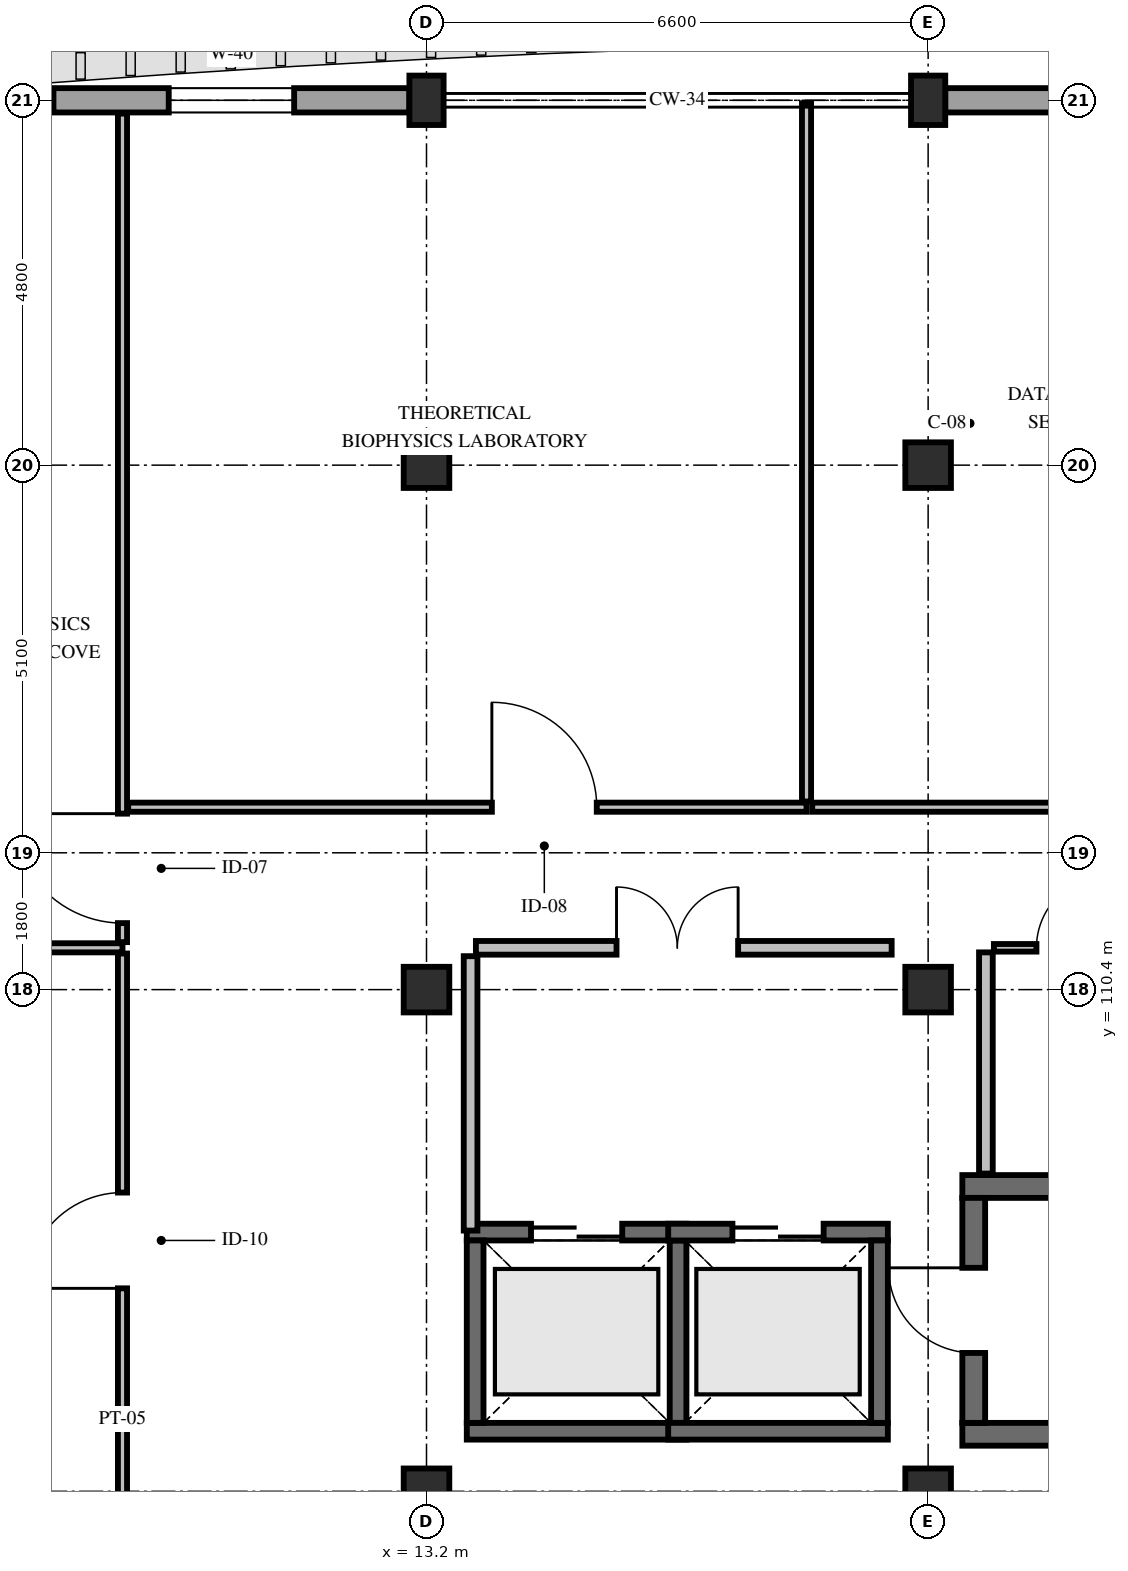
"""IFC4 building model, lengths in metres.
Left out: names, types, materials, properties, quantities, classifications, styles, units other than length and angle.
Written with IfcOpenShell. Run it as: python <this file> out.ifc"""

import sys

from ifc_helpers import new_model, si_unit, direction, frame, frame_2d, origin, origin_2d, place, context, subcontext, project, spatial, rectangle, extrude, element, fill, save


model = new_model("IFC4")
c1 = context("Model", 3, precision=1e-05, world=origin(), true_north=direction((0.0, 1.0)))
c2 = subcontext(c1, "Body", "Model", "MODEL_VIEW")
j1 = project(units=[si_unit("LENGTHUNIT", "METRE"), si_unit("PLANEANGLEUNIT", "RADIAN")], contexts=[c1])
p1 = place(None, origin())
s1 = spatial("IfcSite", under=j1, at=p1, CompositionType="ELEMENT")
p2 = place(p1, origin())
s2 = spatial("IfcBuilding", under=s1, at=p2, CompositionType="ELEMENT")
p3 = place(p2, frame((0.0, 0.0, 38.4)))
s3 = spatial("IfcBuildingStorey", under=s2, at=p3, CompositionType="ELEMENT", Elevation=38.4)
for number, where, z_axis, x_axis in (
    (1, (13.2, 103.8, 0.0), (0.0, 0.0, 1.0), (1.0, 0.0, 0.0)),
    (2, (13.2, 110.4, 0.0), (0.0, 0.0, 1.0), (1.0, 0.0, 0.0)),
    (3, (13.2, 117.3, 0.0), (0.0, 0.0, 1.0), (1.0, 0.0, 0.0)),
):
    element("IfcColumn", number, at=place(p3, frame(where, z_axis=z_axis, x_axis=x_axis)), inside=s3, PredefinedType="COLUMN", context=c2, shape_type="SweptSolid", body=[
        extrude(rectangle(XDim=0.6, YDim=0.6, at=origin_2d()), origin(), (0.0, 0.0, 1.0), 4.2),
    ])
p4 = place(p3, frame((13.2, 122.1, 0.0), z_axis=(0.0, 0.0, 1.0), x_axis=(1.0, 0.0, 0.0)))
e4 = element("IfcColumn", 4, at=p4, inside=s3, PredefinedType="PILASTER", context=c2, shape_type="SweptSolid", body=[
    extrude(rectangle(XDim=0.45, YDim=0.65, at=origin_2d()), origin(), (0.0, 0.0, 1.0), 4.2),
])
for number, where, z_axis, x_axis in (
    (5, (19.8, 103.8, 0.0), (0.0, 0.0, 1.0), (1.0, 0.0, 0.0)),
    (6, (19.8, 110.4, 0.0), (0.0, 0.0, 1.0), (1.0, 0.0, 0.0)),
    (7, (19.8, 117.3, 0.0), (0.0, 0.0, 1.0), (1.0, 0.0, 0.0)),
):
    element("IfcColumn", number, at=place(p3, frame(where, z_axis=z_axis, x_axis=x_axis)), inside=s3, PredefinedType="COLUMN", context=c2, shape_type="SweptSolid", body=[
        extrude(rectangle(XDim=0.6, YDim=0.6, at=origin_2d()), origin(), (0.0, 0.0, 1.0), 4.2),
    ])
p5 = place(p3, frame((19.8, 122.1, 0.0), z_axis=(0.0, 0.0, 1.0), x_axis=(1.0, 0.0, 0.0)))
e8 = element("IfcColumn", 8, at=p5, inside=s3, PredefinedType="PILASTER", context=c2, shape_type="SweptSolid", body=[
    extrude(rectangle(XDim=0.45, YDim=0.65, at=origin_2d()), origin(), (0.0, 0.0, 1.0), 4.2),
])
p6 = place(p3, frame((5.125, 122.1, 0.0), z_axis=(0.0, 0.0, 1.0), x_axis=(1.0, 0.0, 0.0)))
e9 = element("IfcWall", 9, at=p6, inside=s3, PredefinedType="STANDARD", context=c2, shape_type="SweptSolid", body=[
    extrude(rectangle(XDim=7.85, YDim=0.32, at=frame_2d((3.925, 0.0))), origin(), (0.0, 0.0, 1.0), 3.33),
])
p7 = place(p6, frame((1.517, 0.0, 0.85)))
e10 = element("IfcOpeningElement", 10, at=p7, cuts=e9, PredefinedType="OPENING", context=c2, shape_type="SweptSolid", body=[
    extrude(rectangle(XDim=1.65, YDim=2.08, at=frame_2d((0.825, 1.04))), frame((0.0, 0.175, 0.0), z_axis=(0.0, -1.0, 0.0), x_axis=(1.0, 0.0, 0.0)), (0.0, 0.0, 1.0), 0.35),
])
p8 = place(p6, frame((4.683, 0.0, 0.85)))
e11 = element("IfcOpeningElement", 11, at=p8, cuts=e9, PredefinedType="OPENING", context=c2, shape_type="SweptSolid", body=[
    extrude(rectangle(XDim=1.65, YDim=2.08, at=frame_2d((0.825, 1.04))), frame((0.0, 0.175, 0.0), z_axis=(0.0, -1.0, 0.0), x_axis=(1.0, 0.0, 0.0)), (0.0, 0.0, 1.0), 0.35),
])
p9 = place(p3, frame((20.025, 122.1, 0.0), z_axis=(0.0, 0.0, 1.0), x_axis=(1.0, 0.0, 0.0)))
e12 = element("IfcWall", 12, at=p9, inside=s3, PredefinedType="STANDARD", context=c2, shape_type="SweptSolid", body=[
    extrude(rectangle(XDim=7.95, YDim=0.32, at=frame_2d((3.975, 0.0))), origin(), (0.0, 0.0, 1.0), 3.33),
])
p10 = place(p9, frame((1.55, 0.0, 0.85)))
e13 = element("IfcOpeningElement", 13, at=p10, cuts=e12, PredefinedType="OPENING", context=c2, shape_type="SweptSolid", body=[
    extrude(rectangle(XDim=1.65, YDim=2.08, at=frame_2d((0.825, 1.04))), frame((0.0, 0.175, 0.0), z_axis=(0.0, -1.0, 0.0), x_axis=(1.0, 0.0, 0.0)), (0.0, 0.0, 1.0), 0.35),
])
p11 = place(p9, frame((4.75, 0.0, 0.85)))
e14 = element("IfcOpeningElement", 14, at=p11, cuts=e12, PredefinedType="OPENING", context=c2, shape_type="SweptSolid", body=[
    extrude(rectangle(XDim=1.65, YDim=2.08, at=frame_2d((0.825, 1.04))), frame((0.0, 0.175, 0.0), z_axis=(0.0, -1.0, 0.0), x_axis=(1.0, 0.0, 0.0)), (0.0, 0.0, 1.0), 0.35),
])
for number, where, z_axis, x_axis in (
    (15, (20.25, 104.55, 0.0), (0.0, 0.0, 1.0), (1.0, 0.0, 0.0)),
    (16, (20.25, 107.81, 0.0), (0.0, 0.0, 1.0), (1.0, 0.0, 0.0)),
):
    element("IfcWall", number, at=place(p3, frame(where, z_axis=z_axis, x_axis=x_axis)), inside=s3, PredefinedType="SHEAR", context=c2, shape_type="SweptSolid", body=[
        extrude(rectangle(XDim=7.6, YDim=0.3, at=frame_2d((3.8, 0.0))), origin(), (0.0, 0.0, 1.0), 3.9),
    ])
p12 = place(p3, frame((20.4, 104.7, 0.0), z_axis=(0.0, 0.0, 1.0), x_axis=(0.0, 1.0, 0.0)))
e17 = element("IfcWall", 17, at=p12, inside=s3, PredefinedType="SHEAR", context=c2, shape_type="SweptSolid", body=[
    extrude(rectangle(XDim=2.96, YDim=0.3, at=frame_2d((1.48, 0.0))), origin(), (0.0, 0.0, 1.0), 3.9),
])
p13 = place(p12, frame((0.92, 0.0, 0.0)))
e18 = element("IfcOpeningElement", 18, at=p13, cuts=e17, PredefinedType="OPENING", context=c2, shape_type="SweptSolid", body=[
    extrude(rectangle(XDim=1.12, YDim=2.2, at=frame_2d((0.56, 1.1))), frame((0.0, 0.165, 0.0), z_axis=(0.0, -1.0, 0.0), x_axis=(1.0, 0.0, 0.0)), (0.0, 0.0, 1.0), 0.33),
])
p14 = place(p3, frame((13.73, 104.59, 0.0), z_axis=(0.0, 0.0, 1.0), x_axis=(1.0, 0.0, 0.0)))
e19 = element("IfcWall", 19, at=p14, inside=s3, PredefinedType="SHEAR", context=c2, shape_type="SweptSolid", body=[
    extrude(rectangle(XDim=2.89, YDim=0.22, at=frame_2d((1.445, 0.0))), origin(), (0.0, 0.0, 1.0), 3.9),
])
p15 = place(p3, frame((13.73, 107.21, 0.0), z_axis=(0.0, 0.0, 1.0), x_axis=(1.0, 0.0, 0.0)))
e20 = element("IfcWall", 20, at=p15, inside=s3, PredefinedType="SHEAR", context=c2, shape_type="SweptSolid", body=[
    extrude(rectangle(XDim=2.89, YDim=0.22, at=frame_2d((1.445, 0.0))), origin(), (0.0, 0.0, 1.0), 3.9),
])
p16 = place(p15, frame((0.845, 0.0, 0.0)))
e21 = element("IfcOpeningElement", 21, at=p16, cuts=e20, PredefinedType="OPENING", context=c2, shape_type="SweptSolid", body=[
    extrude(rectangle(XDim=1.2, YDim=2.2, at=frame_2d((0.6, 1.1))), frame((0.0, 0.125, 0.0), z_axis=(0.0, -1.0, 0.0), x_axis=(1.0, 0.0, 0.0)), (0.0, 0.0, 1.0), 0.25),
])
for number, where, z_axis, x_axis in (
    (22, (13.84, 104.7, 0.0), (0.0, 0.0, 1.0), (0.0, 1.0, 0.0)),
    (23, (16.51, 104.7, 0.0), (0.0, 0.0, 1.0), (0.0, 1.0, 0.0)),
):
    element("IfcWall", number, at=place(p3, frame(where, z_axis=z_axis, x_axis=x_axis)), inside=s3, PredefinedType="SHEAR", context=c2, shape_type="SweptSolid", body=[
        extrude(rectangle(XDim=2.4, YDim=0.22, at=frame_2d((1.2, 0.0))), origin(), (0.0, 0.0, 1.0), 3.9),
    ])
p17 = place(p3, frame((16.38, 104.59, 0.0), z_axis=(0.0, 0.0, 1.0), x_axis=(1.0, 0.0, 0.0)))
e24 = element("IfcWall", 24, at=p17, inside=s3, PredefinedType="SHEAR", context=c2, shape_type="SweptSolid", body=[
    extrude(rectangle(XDim=2.89, YDim=0.22, at=frame_2d((1.445, 0.0))), origin(), (0.0, 0.0, 1.0), 3.9),
])
p18 = place(p3, frame((16.38, 107.21, 0.0), z_axis=(0.0, 0.0, 1.0), x_axis=(1.0, 0.0, 0.0)))
e25 = element("IfcWall", 25, at=p18, inside=s3, PredefinedType="SHEAR", context=c2, shape_type="SweptSolid", body=[
    extrude(rectangle(XDim=2.89, YDim=0.22, at=frame_2d((1.445, 0.0))), origin(), (0.0, 0.0, 1.0), 3.9),
])
p19 = place(p18, frame((0.845, 0.0, 0.0)))
e26 = element("IfcOpeningElement", 26, at=p19, cuts=e25, PredefinedType="OPENING", context=c2, shape_type="SweptSolid", body=[
    extrude(rectangle(XDim=1.2, YDim=2.2, at=frame_2d((0.6, 1.1))), frame((0.0, 0.125, 0.0), z_axis=(0.0, -1.0, 0.0), x_axis=(1.0, 0.0, 0.0)), (0.0, 0.0, 1.0), 0.25),
])
p20 = place(p3, frame((19.16, 104.7, 0.0), z_axis=(0.0, 0.0, 1.0), x_axis=(0.0, 1.0, 0.0)))
e27 = element("IfcWall", 27, at=p20, inside=s3, PredefinedType="SHEAR", context=c2, shape_type="SweptSolid", body=[
    extrude(rectangle(XDim=2.4, YDim=0.22, at=frame_2d((1.2, 0.0))), origin(), (0.0, 0.0, 1.0), 3.9),
])
p21 = place(p3, frame((13.85, 110.95, 0.0), z_axis=(0.0, 0.0, 1.0), x_axis=(1.0, 0.0, 0.0)))
e28 = element("IfcWall", 28, at=p21, inside=s3, PredefinedType="PARTITIONING", context=c2, shape_type="SweptSolid", body=[
    extrude(rectangle(XDim=5.47, YDim=0.18, at=frame_2d((2.735, 0.0))), origin(), (0.0, 0.0, 1.0), 3.745),
])
p22 = place(p21, frame((1.85, 0.0, 0.0)))
e29 = element("IfcOpeningElement", 29, at=p22, cuts=e28, PredefinedType="OPENING", context=c2, shape_type="SweptSolid", body=[
    extrude(rectangle(XDim=1.6, YDim=2.25, at=frame_2d((0.8, 1.125))), frame((0.0, 0.105, 0.0), z_axis=(0.0, -1.0, 0.0), x_axis=(1.0, 0.0, 0.0)), (0.0, 0.0, 1.0), 0.21),
])
p23 = place(p3, frame((13.78, 107.23, 0.0), z_axis=(0.0, 0.0, 1.0), x_axis=(0.0, 1.0, 0.0)))
e30 = element("IfcWall", 30, at=p23, inside=s3, PredefinedType="PARTITIONING", context=c2, shape_type="SweptSolid", body=[
    extrude(rectangle(XDim=3.61, YDim=0.18, at=frame_2d((1.805, 0.0))), origin(), (0.0, 0.0, 1.0), 3.58),
])
p24 = place(p3, frame((20.56, 107.98, 0.0), z_axis=(0.0, 0.0, 1.0), x_axis=(0.0, 1.0, 0.0)))
e31 = element("IfcWall", 31, at=p24, inside=s3, PredefinedType="PARTITIONING", context=c2, shape_type="SweptSolid", body=[
    extrude(rectangle(XDim=2.91, YDim=0.18, at=frame_2d((1.455, 0.0))), origin(), (0.0, 0.0, 1.0), 3.23),
])
p25 = place(p3, frame((20.665, 110.95, 0.0), z_axis=(0.0, 0.0, 1.0), x_axis=(1.0, 0.0, 0.0)))
e32 = element("IfcWall", 32, at=p25, inside=s3, PredefinedType="PARTITIONING", context=c2, shape_type="SweptSolid", body=[
    extrude(rectangle(XDim=2.085, YDim=0.1, at=frame_2d((1.042, 0.0))), origin(), (0.0, 0.0, 1.0), 3.745),
])
p26 = place(p25, frame((0.56, 0.0, 0.0)))
e33 = element("IfcOpeningElement", 33, at=p26, cuts=e32, PredefinedType="OPENING", context=c2, shape_type="SweptSolid", body=[
    extrude(rectangle(XDim=0.95, YDim=2.15, at=frame_2d((0.475, 1.075))), frame((0.0, 0.065, 0.0), z_axis=(0.0, -1.0, 0.0), x_axis=(1.0, 0.0, 0.0)), (0.0, 0.0, 1.0), 0.13),
])
p27 = place(p3, frame((4.975, 110.95, 0.0), z_axis=(0.0, 0.0, 1.0), x_axis=(1.0, 0.0, 0.0)))
e34 = element("IfcWall", 34, at=p27, inside=s3, PredefinedType="PARTITIONING", context=c2, shape_type="SweptSolid", body=[
    extrude(rectangle(XDim=4.225, YDim=0.12, at=frame_2d((2.112, 0.0))), origin(), (0.0, 0.0, 1.0), 3.48),
])
p28 = place(p3, frame((9.2, 103.275, 0.0), z_axis=(0.0, 0.0, 1.0), x_axis=(0.0, 1.0, 0.0)))
e35 = element("IfcWall", 35, at=p28, inside=s3, PredefinedType="PARTITIONING", context=c2, shape_type="SweptSolid", body=[
    extrude(rectangle(XDim=7.6, YDim=0.12, at=frame_2d((3.8, 0.0))), origin(), (0.0, 0.0, 1.0), 3.23),
])
p29 = place(p28, frame((3.195, 0.0, 0.0)))
e36 = element("IfcOpeningElement", 36, at=p29, cuts=e35, PredefinedType="OPENING", context=c2, shape_type="SweptSolid", body=[
    extrude(rectangle(XDim=1.26, YDim=2.2, at=frame_2d((0.63, 1.1))), frame((0.0, 0.075, 0.0), z_axis=(0.0, -1.0, 0.0), x_axis=(1.0, 0.0, 0.0)), (0.0, 0.0, 1.0), 0.15),
])
p30 = place(p3, frame((9.2, 111.025, 0.0), z_axis=(0.0, 0.0, 1.0), x_axis=(0.0, 1.0, 0.0)))
e37 = element("IfcWall", 37, at=p30, inside=s3, PredefinedType="PARTITIONING", context=c2, shape_type="SweptSolid", body=[
    extrude(rectangle(XDim=10.9, YDim=0.12, at=frame_2d((5.45, 0.0))), origin(), (0.0, 0.0, 1.0), 3.23),
])
p31 = place(p30, frame((0.25, 0.0, 0.0)))
e38 = element("IfcOpeningElement", 38, at=p31, cuts=e37, PredefinedType="OPENING", context=c2, shape_type="SweptSolid", body=[
    extrude(rectangle(XDim=1.44, YDim=2.25, at=frame_2d((0.72, 1.125))), frame((0.0, 0.075, 0.0), z_axis=(0.0, -1.0, 0.0), x_axis=(1.0, 0.0, 0.0)), (0.0, 0.0, 1.0), 0.15),
])
p32 = place(p3, frame((9.275, 112.8, 0.0), z_axis=(0.0, 0.0, 1.0), x_axis=(1.0, 0.0, 0.0)))
e39 = element("IfcWall", 39, at=p32, inside=s3, PredefinedType="PARTITIONING", context=c2, shape_type="SweptSolid", body=[
    extrude(rectangle(XDim=8.925, YDim=0.12, at=frame_2d((4.462, 0.0))), origin(), (0.0, 0.0, 1.0), 3.53),
])
p33 = place(p32, frame((4.785, 0.0, 0.0)))
e40 = element("IfcOpeningElement", 40, at=p33, cuts=e39, PredefinedType="OPENING", context=c2, shape_type="SweptSolid", body=[
    extrude(rectangle(XDim=1.38, YDim=2.25, at=frame_2d((0.69, 1.125))), frame((0.0, 0.075, 0.0), z_axis=(0.0, -1.0, 0.0), x_axis=(1.0, 0.0, 0.0)), (0.0, 0.0, 1.0), 0.15),
])
p34 = place(p3, frame((18.2, 112.875, 0.0), z_axis=(0.0, 0.0, 1.0), x_axis=(0.0, 1.0, 0.0)))
e41 = element("IfcWall", 41, at=p34, inside=s3, PredefinedType="PARTITIONING", context=c2, shape_type="SweptSolid", body=[
    extrude(rectangle(XDim=9.185, YDim=0.12, at=frame_2d((4.593, 0.0))), origin(), (0.0, 0.0, 1.0), 3.33),
])
p35 = place(p3, frame((18.275, 112.8, 0.0), z_axis=(0.0, 0.0, 1.0), x_axis=(1.0, 0.0, 0.0)))
e42 = element("IfcWall", 42, at=p35, inside=s3, PredefinedType="PARTITIONING", context=c2, shape_type="SweptSolid", body=[
    extrude(rectangle(XDim=9.325, YDim=0.12, at=frame_2d((4.663, 0.0))), origin(), (0.0, 0.0, 1.0), 3.53),
])
p36 = place(p35, frame((3.785, 0.0, 0.0)))
e43 = element("IfcOpeningElement", 43, at=p36, cuts=e42, PredefinedType="OPENING", context=c2, shape_type="SweptSolid", body=[
    extrude(rectangle(XDim=1.68, YDim=2.3, at=frame_2d((0.84, 1.15))), frame((0.0, 0.075, 0.0), z_axis=(0.0, -1.0, 0.0), x_axis=(1.0, 0.0, 0.0)), (0.0, 0.0, 1.0), 0.15),
])
p37 = place(p7, origin())
e44 = element("IfcWindow", 44, at=p37, inside=s3, PartitioningType="SINGLE_PANEL", PredefinedType="WINDOW", context=c2, shape_type="SweptSolid", body=[
    extrude(rectangle(XDim=1.65, YDim=2.08, at=frame_2d((0.825, 1.04))), frame((0.0, 0.03, 0.0), z_axis=(0.0, -1.0, 0.0), x_axis=(1.0, 0.0, 0.0)), (0.0, 0.0, 1.0), 0.06),
])
fill(e10, e44)
p38 = place(p8, origin())
e45 = element("IfcWindow", 45, at=p38, inside=s3, PartitioningType="SINGLE_PANEL", PredefinedType="WINDOW", context=c2, shape_type="SweptSolid", body=[
    extrude(rectangle(XDim=1.65, YDim=2.08, at=frame_2d((0.825, 1.04))), frame((0.0, 0.03, 0.0), z_axis=(0.0, -1.0, 0.0), x_axis=(1.0, 0.0, 0.0)), (0.0, 0.0, 1.0), 0.06),
])
fill(e11, e45)
p39 = place(p13, origin())
e46 = element("IfcDoor", 46, at=p39, inside=s3, OperationType="SINGLE_SWING_RIGHT", PredefinedType="DOOR", context=c2, shape_type="SweptSolid", body=[
    extrude(rectangle(XDim=1.12, YDim=2.2, at=frame_2d((0.56, 1.1))), frame((0.0, 0.025, 0.0), z_axis=(0.0, -1.0, 0.0), x_axis=(1.0, 0.0, 0.0)), (0.0, 0.0, 1.0), 0.05),
])
fill(e18, e46)
p40 = place(p16, origin())
e47 = element("IfcDoor", 47, at=p40, inside=s3, OperationType="DOUBLE_DOOR_SLIDING", PredefinedType="DOOR", context=c2, shape_type="SweptSolid", body=[
    extrude(rectangle(XDim=1.2, YDim=2.2, at=frame_2d((0.6, 1.1))), frame((0.0, 0.025, 0.0), z_axis=(0.0, -1.0, 0.0), x_axis=(1.0, 0.0, 0.0)), (0.0, 0.0, 1.0), 0.05),
])
fill(e21, e47)
p41 = place(p19, origin())
e48 = element("IfcDoor", 48, at=p41, inside=s3, OperationType="DOUBLE_DOOR_SLIDING", PredefinedType="DOOR", context=c2, shape_type="SweptSolid", body=[
    extrude(rectangle(XDim=1.2, YDim=2.2, at=frame_2d((0.6, 1.1))), frame((0.0, 0.025, 0.0), z_axis=(0.0, -1.0, 0.0), x_axis=(1.0, 0.0, 0.0)), (0.0, 0.0, 1.0), 0.05),
])
fill(e26, e48)
p42 = place(p22, origin())
e49 = element("IfcDoor", 49, at=p42, inside=s3, OperationType="DOUBLE_DOOR_SINGLE_SWING", PredefinedType="DOOR", context=c2, shape_type="SweptSolid", body=[
    extrude(rectangle(XDim=1.6, YDim=2.25, at=frame_2d((0.8, 1.125))), frame((0.0, 0.025, 0.0), z_axis=(0.0, -1.0, 0.0), x_axis=(1.0, 0.0, 0.0)), (0.0, 0.0, 1.0), 0.05),
])
fill(e29, e49)
p43 = place(p26, origin())
e50 = element("IfcDoor", 50, at=p43, inside=s3, OperationType="SINGLE_SWING_RIGHT", PredefinedType="DOOR", context=c2, shape_type="SweptSolid", body=[
    extrude(rectangle(XDim=0.95, YDim=2.15, at=frame_2d((0.475, 1.075))), frame((0.0, 0.025, 0.0), z_axis=(0.0, -1.0, 0.0), x_axis=(1.0, 0.0, 0.0)), (0.0, 0.0, 1.0), 0.05),
])
fill(e33, e50)
p44 = place(p29, origin())
e51 = element("IfcDoor", 51, at=p44, inside=s3, OperationType="SINGLE_SWING_LEFT", PredefinedType="DOOR", context=c2, shape_type="SweptSolid", body=[
    extrude(rectangle(XDim=1.26, YDim=2.2, at=frame_2d((0.63, 1.1))), frame((0.0, 0.025, 0.0), z_axis=(0.0, -1.0, 0.0), x_axis=(1.0, 0.0, 0.0)), (0.0, 0.0, 1.0), 0.05),
])
fill(e36, e51)
p45 = place(p31, origin())
e52 = element("IfcDoor", 52, at=p45, inside=s3, OperationType="SINGLE_SWING_RIGHT", PredefinedType="DOOR", context=c2, shape_type="SweptSolid", body=[
    extrude(rectangle(XDim=1.44, YDim=2.25, at=frame_2d((0.72, 1.125))), frame((0.0, 0.025, 0.0), z_axis=(0.0, -1.0, 0.0), x_axis=(1.0, 0.0, 0.0)), (0.0, 0.0, 1.0), 0.05),
])
fill(e38, e52)
p46 = place(p33, origin())
e53 = element("IfcDoor", 53, at=p46, inside=s3, OperationType="SINGLE_SWING_LEFT", PredefinedType="DOOR", context=c2, shape_type="SweptSolid", body=[
    extrude(rectangle(XDim=1.38, YDim=2.25, at=frame_2d((0.69, 1.125))), frame((0.0, 0.025, 0.0), z_axis=(0.0, -1.0, 0.0), x_axis=(1.0, 0.0, 0.0)), (0.0, 0.0, 1.0), 0.05),
])
fill(e40, e53)
save(model, sys.argv[1])
